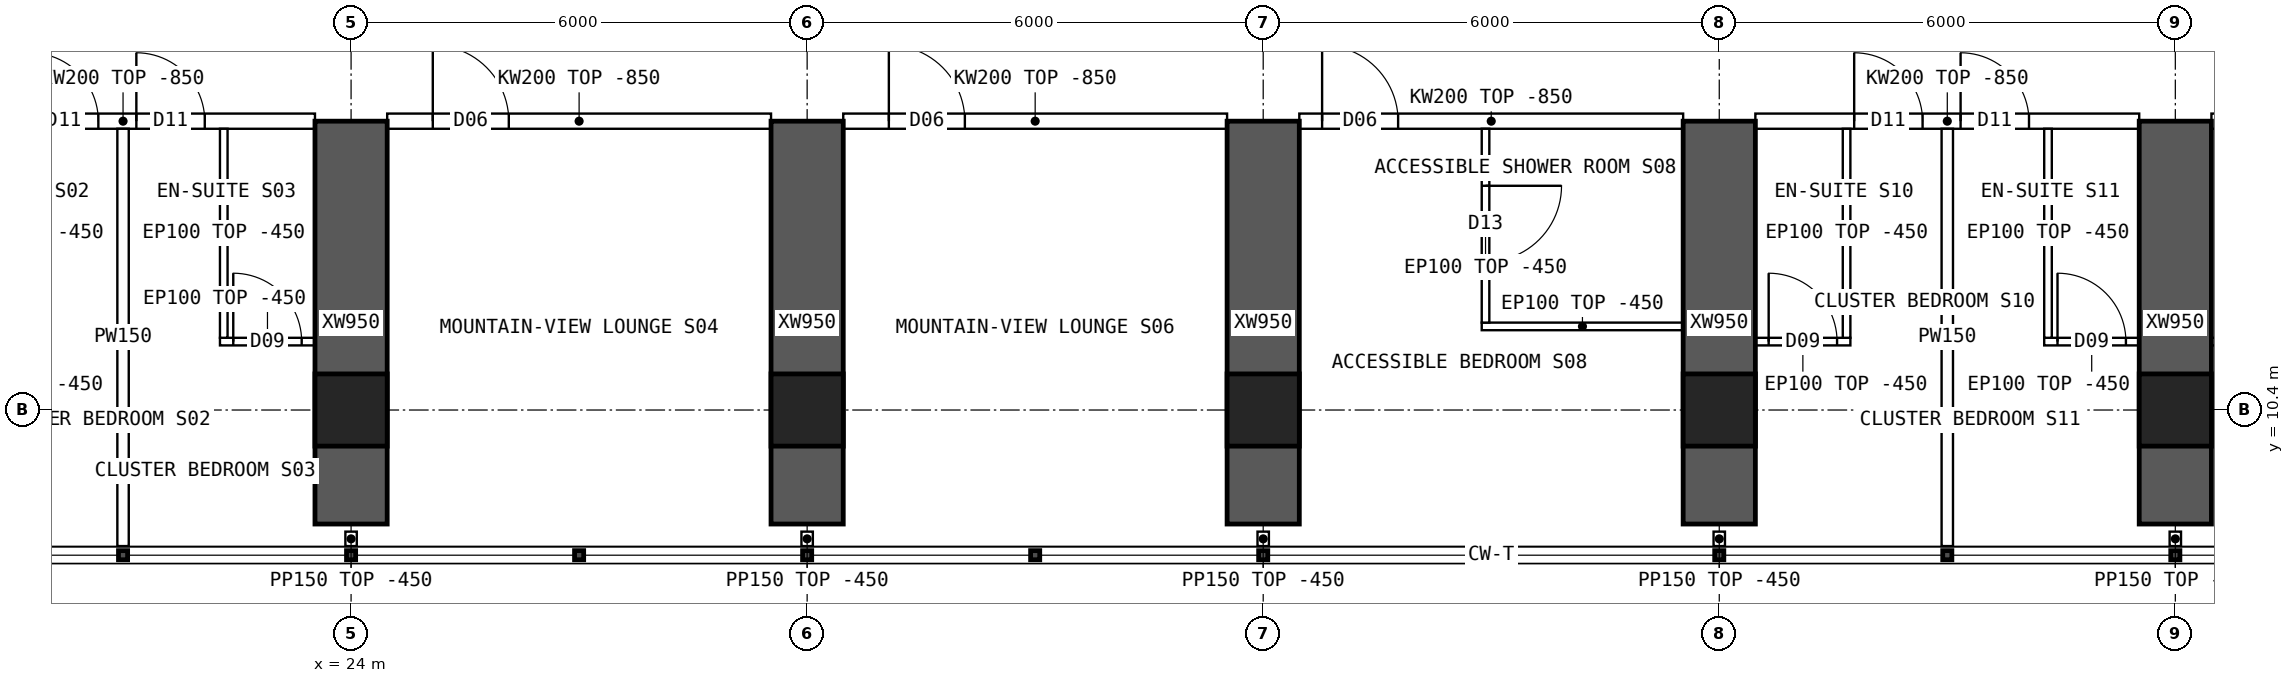
"""IFC4 building model, lengths in metres.
Left out: names, types, materials, properties, quantities, classifications, styles, units other than length and angle.
Written with IfcOpenShell. Run it as: python <this file> out.ifc"""

import sys

from ifc_helpers import new_model, si_unit, direction, frame, frame_2d, origin, origin_2d, place, context, subcontext, project, spatial, polyline, rectangle, hollow_rectangle, outline, extrude, element, fill, save


model = new_model("IFC4")
c1 = context("Model", 3, precision=1e-05, world=origin(), true_north=direction((0.0, 1.0)))
c2 = subcontext(c1, "Body", "Model", "MODEL_VIEW")
j1 = project(units=[si_unit("LENGTHUNIT", "METRE"), si_unit("PLANEANGLEUNIT", "RADIAN")], contexts=[c1])
p1 = place(None, origin())
s1 = spatial("IfcSite", under=j1, at=p1, CompositionType="ELEMENT")
p2 = place(p1, origin())
s2 = spatial("IfcBuilding", under=s1, at=p2, CompositionType="ELEMENT")
p3 = place(p2, frame((0.0, 0.0, 110.65)))
s3 = spatial("IfcBuildingStorey", under=s2, at=p3, CompositionType="ELEMENT", Elevation=110.65)
for number, where, z_axis, x_axis in (
    (1, (24.0, 10.4, 0.0), (0.0, 0.0, 1.0), (1.0, 0.0, 0.0)),
    (2, (30.0, 10.4, 0.0), (0.0, 0.0, 1.0), (1.0, 0.0, 0.0)),
    (3, (36.0, 10.4, 0.0), (0.0, 0.0, 1.0), (1.0, 0.0, 0.0)),
    (4, (42.0, 10.4, 0.0), (0.0, 0.0, 1.0), (1.0, 0.0, 0.0)),
    (5, (48.0, 10.4, 0.0), (0.0, 0.0, 1.0), (1.0, 0.0, 0.0)),
):
    element("IfcColumn", number, at=place(p3, frame(where, z_axis=z_axis, x_axis=x_axis)), inside=s3, PredefinedType="COLUMN", context=c2, shape_type="SweptSolid", body=[
        extrude(hollow_rectangle(XDim=0.95, YDim=0.95, WallThickness=0.095, at=origin_2d()), origin(), (0.0, 0.0, 1.0), 3.75),
    ])
for number, where, z_axis, x_axis in (
    (6, (24.0, 8.9, 0.0), (0.0, 0.0, 1.0), (0.0, 1.0, 0.0)),
    (7, (30.0, 8.9, 0.0), (0.0, 0.0, 1.0), (0.0, 1.0, 0.0)),
    (8, (36.0, 8.9, 0.0), (0.0, 0.0, 1.0), (0.0, 1.0, 0.0)),
    (9, (42.0, 8.9, 0.0), (0.0, 0.0, 1.0), (0.0, 1.0, 0.0)),
    (10, (48.0, 8.9, 0.0), (0.0, 0.0, 1.0), (0.0, 1.0, 0.0)),
):
    element("IfcWall", number, at=place(p3, frame(where, z_axis=z_axis, x_axis=x_axis)), inside=s3, PredefinedType="SHEAR", context=c2, shape_type="SweptSolid", body=[
        extrude(rectangle(XDim=5.3, YDim=0.95, at=frame_2d((2.65, 0.0))), origin(), (0.0, 0.0, 1.0), 3.75),
    ])
p4 = place(p3, frame((18.475, 14.2, 0.0), z_axis=(0.0, 0.0, 1.0), x_axis=(1.0, 0.0, 0.0)))
e11 = element("IfcWall", 11, at=p4, inside=s3, PredefinedType="SOLIDWALL", context=c2, shape_type="SweptSolid", body=[
    extrude(outline(polyline([(0.0, 0.0), (5.05, 0.0), (5.05, 2.9), (0.0, 2.9), (0.0, 0.0)])), frame((0.0, 0.1, 0.0), z_axis=(0.0, -1.0, 0.0), x_axis=(1.0, 0.0, 0.0)), (0.0, 0.0, 1.0), 0.2),
])
p5 = place(p4, frame((1.3, 0.0, 0.0)))
e12 = element("IfcOpeningElement", 12, at=p5, cuts=e11, PredefinedType="OPENING", context=c2, shape_type="SweptSolid", body=[
    extrude(rectangle(XDim=0.9, YDim=2.1, at=frame_2d((0.45, 1.05))), frame((0.0, 0.11, 0.0), z_axis=(0.0, -1.0, 0.0), x_axis=(1.0, 0.0, 0.0)), (0.0, 0.0, 1.0), 0.22),
])
p6 = place(p4, frame((2.7, 0.0, 0.0)))
e13 = element("IfcOpeningElement", 13, at=p6, cuts=e11, PredefinedType="OPENING", context=c2, shape_type="SweptSolid", body=[
    extrude(rectangle(XDim=0.9, YDim=2.1, at=frame_2d((0.45, 1.05))), frame((0.0, 0.11, 0.0), z_axis=(0.0, -1.0, 0.0), x_axis=(1.0, 0.0, 0.0)), (0.0, 0.0, 1.0), 0.22),
])
p7 = place(p3, frame((24.475, 14.2, 0.0), z_axis=(0.0, 0.0, 1.0), x_axis=(1.0, 0.0, 0.0)))
e14 = element("IfcWall", 14, at=p7, inside=s3, PredefinedType="SOLIDWALL", context=c2, shape_type="SweptSolid", body=[
    extrude(outline(polyline([(0.0, 0.0), (5.05, 0.0), (5.05, 2.9), (0.0, 2.9), (0.0, 0.0)])), frame((0.0, 0.1, 0.0), z_axis=(0.0, -1.0, 0.0), x_axis=(1.0, 0.0, 0.0)), (0.0, 0.0, 1.0), 0.2),
])
p8 = place(p7, frame((0.6, 0.0, 0.0)))
e15 = element("IfcOpeningElement", 15, at=p8, cuts=e14, PredefinedType="OPENING", context=c2, shape_type="SweptSolid", body=[
    extrude(rectangle(XDim=1.0, YDim=2.1, at=frame_2d((0.5, 1.05))), frame((0.0, 0.11, 0.0), z_axis=(0.0, -1.0, 0.0), x_axis=(1.0, 0.0, 0.0)), (0.0, 0.0, 1.0), 0.22),
])
p9 = place(p3, frame((30.475, 14.2, 0.0), z_axis=(0.0, 0.0, 1.0), x_axis=(1.0, 0.0, 0.0)))
e16 = element("IfcWall", 16, at=p9, inside=s3, PredefinedType="SOLIDWALL", context=c2, shape_type="SweptSolid", body=[
    extrude(outline(polyline([(0.0, 0.0), (5.05, 0.0), (5.05, 2.9), (0.0, 2.9), (0.0, 0.0)])), frame((0.0, 0.1, 0.0), z_axis=(0.0, -1.0, 0.0), x_axis=(1.0, 0.0, 0.0)), (0.0, 0.0, 1.0), 0.2),
])
p10 = place(p9, frame((0.6, 0.0, 0.0)))
e17 = element("IfcOpeningElement", 17, at=p10, cuts=e16, PredefinedType="OPENING", context=c2, shape_type="SweptSolid", body=[
    extrude(rectangle(XDim=1.0, YDim=2.1, at=frame_2d((0.5, 1.05))), frame((0.0, 0.11, 0.0), z_axis=(0.0, -1.0, 0.0), x_axis=(1.0, 0.0, 0.0)), (0.0, 0.0, 1.0), 0.22),
])
p11 = place(p3, frame((36.475, 14.2, 0.0), z_axis=(0.0, 0.0, 1.0), x_axis=(1.0, 0.0, 0.0)))
e18 = element("IfcWall", 18, at=p11, inside=s3, PredefinedType="SOLIDWALL", context=c2, shape_type="SweptSolid", body=[
    extrude(outline(polyline([(0.0, 0.0), (5.05, 0.0), (5.05, 2.9), (0.0, 2.9), (0.0, 0.0)])), frame((0.0, 0.1, 0.0), z_axis=(0.0, -1.0, 0.0), x_axis=(1.0, 0.0, 0.0)), (0.0, 0.0, 1.0), 0.2),
])
p12 = place(p11, frame((0.3, 0.0, 0.0)))
e19 = element("IfcOpeningElement", 19, at=p12, cuts=e18, PredefinedType="OPENING", context=c2, shape_type="SweptSolid", body=[
    extrude(rectangle(XDim=1.0, YDim=2.1, at=frame_2d((0.5, 1.05))), frame((0.0, 0.11, 0.0), z_axis=(0.0, -1.0, 0.0), x_axis=(1.0, 0.0, 0.0)), (0.0, 0.0, 1.0), 0.22),
])
p13 = place(p3, frame((42.475, 14.2, 0.0), z_axis=(0.0, 0.0, 1.0), x_axis=(1.0, 0.0, 0.0)))
e20 = element("IfcWall", 20, at=p13, inside=s3, PredefinedType="SOLIDWALL", context=c2, shape_type="SweptSolid", body=[
    extrude(outline(polyline([(0.0, 0.0), (5.05, 0.0), (5.05, 2.9), (0.0, 2.9), (0.0, 0.0)])), frame((0.0, 0.1, 0.0), z_axis=(0.0, -1.0, 0.0), x_axis=(1.0, 0.0, 0.0)), (0.0, 0.0, 1.0), 0.2),
])
p14 = place(p13, frame((1.3, 0.0, 0.0)))
e21 = element("IfcOpeningElement", 21, at=p14, cuts=e20, PredefinedType="OPENING", context=c2, shape_type="SweptSolid", body=[
    extrude(rectangle(XDim=0.9, YDim=2.1, at=frame_2d((0.45, 1.05))), frame((0.0, 0.11, 0.0), z_axis=(0.0, -1.0, 0.0), x_axis=(1.0, 0.0, 0.0)), (0.0, 0.0, 1.0), 0.22),
])
p15 = place(p13, frame((2.7, 0.0, 0.0)))
e22 = element("IfcOpeningElement", 22, at=p15, cuts=e20, PredefinedType="OPENING", context=c2, shape_type="SweptSolid", body=[
    extrude(rectangle(XDim=0.9, YDim=2.1, at=frame_2d((0.45, 1.05))), frame((0.0, 0.11, 0.0), z_axis=(0.0, -1.0, 0.0), x_axis=(1.0, 0.0, 0.0)), (0.0, 0.0, 1.0), 0.22),
])
p16 = place(p3, frame((48.475, 14.2, 0.0), z_axis=(0.0, 0.0, 1.0), x_axis=(1.0, 0.0, 0.0)))
e23 = element("IfcWall", 23, at=p16, inside=s3, PredefinedType="SOLIDWALL", context=c2, shape_type="SweptSolid", body=[
    extrude(outline(polyline([(0.0, 0.0), (5.05, 0.0), (5.05, 2.9), (0.0, 2.9), (0.0, 0.0)])), frame((0.0, 0.1, 0.0), z_axis=(0.0, -1.0, 0.0), x_axis=(1.0, 0.0, 0.0)), (0.0, 0.0, 1.0), 0.2),
])
p17 = place(p16, frame((1.3, 0.0, 0.0)))
e24 = element("IfcOpeningElement", 24, at=p17, cuts=e23, PredefinedType="OPENING", context=c2, shape_type="SweptSolid", body=[
    extrude(rectangle(XDim=0.9, YDim=2.1, at=frame_2d((0.45, 1.05))), frame((0.0, 0.11, 0.0), z_axis=(0.0, -1.0, 0.0), x_axis=(1.0, 0.0, 0.0)), (0.0, 0.0, 1.0), 0.22),
])
p18 = place(p16, frame((2.7, 0.0, 0.0)))
e25 = element("IfcOpeningElement", 25, at=p18, cuts=e23, PredefinedType="OPENING", context=c2, shape_type="SweptSolid", body=[
    extrude(rectangle(XDim=0.9, YDim=2.1, at=frame_2d((0.45, 1.05))), frame((0.0, 0.11, 0.0), z_axis=(0.0, -1.0, 0.0), x_axis=(1.0, 0.0, 0.0)), (0.0, 0.0, 1.0), 0.22),
])
p19 = place(p3, frame((21.0, 8.61, 0.0), z_axis=(0.0, 0.0, 1.0), x_axis=(0.0, 1.0, 0.0)))
e26 = element("IfcWall", 26, at=p19, inside=s3, PredefinedType="PARTITIONING", context=c2, shape_type="SweptSolid", body=[
    extrude(outline(polyline([(0.0, 0.0), (5.49, 0.0), (5.49, 2.9), (5.442, 2.9), (5.44, 3.3), (1.992, 3.3), (1.99, 2.9), (1.592, 2.9), (1.59, 3.3), (0.0, 3.3), (0.0, 0.0)])), frame((0.0, 0.075, 0.0), z_axis=(0.0, -1.0, 0.0), x_axis=(1.0, 0.0, 0.0)), (0.0, 0.0, 1.0), 0.15),
])
p20 = place(p3, frame((23.525, 11.3, 0.0), z_axis=(0.0, 0.0, 1.0), x_axis=(-1.0, 0.0, 0.0)))
e27 = element("IfcWall", 27, at=p20, inside=s3, PredefinedType="PARTITIONING", context=c2, shape_type="SweptSolid", body=[
    extrude(rectangle(XDim=1.25, YDim=0.1, at=frame_2d((0.625, 0.0))), origin(), (0.0, 0.0, 1.0), 3.3),
])
p21 = place(p20, frame((0.175, 0.0, 0.0)))
e28 = element("IfcOpeningElement", 28, at=p21, cuts=e27, PredefinedType="OPENING", context=c2, shape_type="SweptSolid", body=[
    extrude(rectangle(XDim=0.9, YDim=2.1, at=frame_2d((0.45, 1.05))), frame((0.0, 0.06, 0.0), z_axis=(0.0, -1.0, 0.0), x_axis=(1.0, 0.0, 0.0)), (0.0, 0.0, 1.0), 0.12),
])
p22 = place(p3, frame((22.325, 11.35, 0.0), z_axis=(0.0, 0.0, 1.0), x_axis=(0.0, 1.0, 0.0)))
e29 = element("IfcWall", 29, at=p22, inside=s3, PredefinedType="PARTITIONING", context=c2, shape_type="SweptSolid", body=[
    extrude(outline(polyline([(0.0, 0.0), (2.75, 0.0), (2.75, 2.9), (2.702, 2.9), (2.7, 3.3), (0.0, 3.3), (0.0, 0.0)])), frame((0.0, 0.05, 0.0), z_axis=(0.0, -1.0, 0.0), x_axis=(1.0, 0.0, 0.0)), (0.0, 0.0, 1.0), 0.1),
])
p23 = place(p3, frame((38.875, 11.5, 0.0), z_axis=(0.0, 0.0, 1.0), x_axis=(1.0, 0.0, 0.0)))
e30 = element("IfcWall", 30, at=p23, inside=s3, PredefinedType="PARTITIONING", context=c2, shape_type="SweptSolid", body=[
    extrude(rectangle(XDim=2.65, YDim=0.1, at=frame_2d((1.325, 0.0))), origin(), (0.0, 0.0, 1.0), 3.3),
])
p24 = place(p3, frame((38.925, 11.55, 0.0), z_axis=(0.0, 0.0, 1.0), x_axis=(0.0, 1.0, 0.0)))
e31 = element("IfcWall", 31, at=p24, inside=s3, PredefinedType="PARTITIONING", context=c2, shape_type="SweptSolid", body=[
    extrude(outline(polyline([(0.0, 0.0), (2.55, 0.0), (2.55, 2.9), (2.502, 2.9), (2.5, 3.3), (0.0, 3.3), (0.0, 0.0)])), frame((0.0, 0.05, 0.0), z_axis=(0.0, -1.0, 0.0), x_axis=(1.0, 0.0, 0.0)), (0.0, 0.0, 1.0), 0.1),
])
p25 = place(p24, frame((0.8, 0.0, 0.0)))
e32 = element("IfcOpeningElement", 32, at=p25, cuts=e31, PredefinedType="OPENING", context=c2, shape_type="SweptSolid", body=[
    extrude(rectangle(XDim=1.0, YDim=2.1, at=frame_2d((0.5, 1.05))), frame((0.0, 0.06, 0.0), z_axis=(0.0, -1.0, 0.0), x_axis=(1.0, 0.0, 0.0)), (0.0, 0.0, 1.0), 0.12),
])
p26 = place(p3, frame((45.0, 8.61, 0.0), z_axis=(0.0, 0.0, 1.0), x_axis=(0.0, 1.0, 0.0)))
e33 = element("IfcWall", 33, at=p26, inside=s3, PredefinedType="PARTITIONING", context=c2, shape_type="SweptSolid", body=[
    extrude(outline(polyline([(0.0, 0.0), (5.49, 0.0), (5.49, 2.9), (5.442, 2.9), (5.44, 3.3), (1.992, 3.3), (1.99, 2.9), (1.592, 2.9), (1.59, 3.3), (0.0, 3.3), (0.0, 0.0)])), frame((0.0, 0.075, 0.0), z_axis=(0.0, -1.0, 0.0), x_axis=(1.0, 0.0, 0.0)), (0.0, 0.0, 1.0), 0.15),
])
p27 = place(p3, frame((43.725, 11.3, 0.0), z_axis=(0.0, 0.0, 1.0), x_axis=(-1.0, 0.0, 0.0)))
e34 = element("IfcWall", 34, at=p27, inside=s3, PredefinedType="PARTITIONING", context=c2, shape_type="SweptSolid", body=[
    extrude(rectangle(XDim=1.25, YDim=0.1, at=frame_2d((0.625, 0.0))), origin(), (0.0, 0.0, 1.0), 3.3),
])
p28 = place(p27, frame((0.175, 0.0, 0.0)))
e35 = element("IfcOpeningElement", 35, at=p28, cuts=e34, PredefinedType="OPENING", context=c2, shape_type="SweptSolid", body=[
    extrude(rectangle(XDim=0.9, YDim=2.1, at=frame_2d((0.45, 1.05))), frame((0.0, 0.06, 0.0), z_axis=(0.0, -1.0, 0.0), x_axis=(1.0, 0.0, 0.0)), (0.0, 0.0, 1.0), 0.12),
])
p29 = place(p3, frame((43.675, 11.35, 0.0), z_axis=(0.0, 0.0, 1.0), x_axis=(0.0, 1.0, 0.0)))
e36 = element("IfcWall", 36, at=p29, inside=s3, PredefinedType="PARTITIONING", context=c2, shape_type="SweptSolid", body=[
    extrude(outline(polyline([(0.0, 0.0), (2.75, 0.0), (2.75, 2.9), (2.702, 2.9), (2.7, 3.3), (0.0, 3.3), (0.0, 0.0)])), frame((0.0, 0.05, 0.0), z_axis=(0.0, -1.0, 0.0), x_axis=(1.0, 0.0, 0.0)), (0.0, 0.0, 1.0), 0.1),
])
p30 = place(p3, frame((47.525, 11.3, 0.0), z_axis=(0.0, 0.0, 1.0), x_axis=(-1.0, 0.0, 0.0)))
e37 = element("IfcWall", 37, at=p30, inside=s3, PredefinedType="PARTITIONING", context=c2, shape_type="SweptSolid", body=[
    extrude(rectangle(XDim=1.25, YDim=0.1, at=frame_2d((0.625, 0.0))), origin(), (0.0, 0.0, 1.0), 3.3),
])
p31 = place(p30, frame((0.175, 0.0, 0.0)))
e38 = element("IfcOpeningElement", 38, at=p31, cuts=e37, PredefinedType="OPENING", context=c2, shape_type="SweptSolid", body=[
    extrude(rectangle(XDim=0.9, YDim=2.1, at=frame_2d((0.45, 1.05))), frame((0.0, 0.06, 0.0), z_axis=(0.0, -1.0, 0.0), x_axis=(1.0, 0.0, 0.0)), (0.0, 0.0, 1.0), 0.12),
])
p32 = place(p3, frame((46.325, 11.35, 0.0), z_axis=(0.0, 0.0, 1.0), x_axis=(0.0, 1.0, 0.0)))
e39 = element("IfcWall", 39, at=p32, inside=s3, PredefinedType="PARTITIONING", context=c2, shape_type="SweptSolid", body=[
    extrude(outline(polyline([(0.0, 0.0), (2.75, 0.0), (2.75, 2.9), (2.702, 2.9), (2.7, 3.3), (0.0, 3.3), (0.0, 0.0)])), frame((0.0, 0.05, 0.0), z_axis=(0.0, -1.0, 0.0), x_axis=(1.0, 0.0, 0.0)), (0.0, 0.0, 1.0), 0.1),
])
p33 = place(p3, frame((49.725, 11.3, 0.0), z_axis=(0.0, 0.0, 1.0), x_axis=(-1.0, 0.0, 0.0)))
e40 = element("IfcWall", 40, at=p33, inside=s3, PredefinedType="PARTITIONING", context=c2, shape_type="SweptSolid", body=[
    extrude(rectangle(XDim=1.25, YDim=0.1, at=frame_2d((0.625, 0.0))), origin(), (0.0, 0.0, 1.0), 3.3),
])
p34 = place(p33, frame((0.175, 0.0, 0.0)))
e41 = element("IfcOpeningElement", 41, at=p34, cuts=e40, PredefinedType="OPENING", context=c2, shape_type="SweptSolid", body=[
    extrude(rectangle(XDim=0.9, YDim=2.1, at=frame_2d((0.45, 1.05))), frame((0.0, 0.06, 0.0), z_axis=(0.0, -1.0, 0.0), x_axis=(1.0, 0.0, 0.0)), (0.0, 0.0, 1.0), 0.12),
])
for number, where, z_axis, x_axis in (
    (42, (24.0, 8.8, 0.0), (0.0, 0.0, 1.0), (0.0, -1.0, 0.0)),
    (43, (30.0, 8.8, 0.0), (0.0, 0.0, 1.0), (0.0, -1.0, 0.0)),
    (44, (36.0, 8.8, 0.0), (0.0, 0.0, 1.0), (0.0, -1.0, 0.0)),
    (45, (42.0, 8.8, 0.0), (0.0, 0.0, 1.0), (0.0, -1.0, 0.0)),
    (46, (48.0, 8.8, 0.0), (0.0, 0.0, 1.0), (0.0, -1.0, 0.0)),
):
    element("IfcWall", number, at=place(p3, frame(where, z_axis=z_axis, x_axis=x_axis)), inside=s3, PredefinedType="PARTITIONING", context=c2, shape_type="SweptSolid", body=[
        extrude(rectangle(XDim=0.19, YDim=0.15, at=frame_2d((0.095, 0.0))), origin(), (0.0, 0.0, 1.0), 3.3),
    ])
p35 = place(p5, origin())
e47 = element("IfcDoor", 47, at=p35, inside=s3, OperationType="SINGLE_SWING_LEFT", PredefinedType="DOOR", context=c2, shape_type="SweptSolid", body=[
    extrude(rectangle(XDim=0.9, YDim=2.1, at=frame_2d((0.45, 1.05))), frame((0.0, 0.025, 0.0), z_axis=(0.0, -1.0, 0.0), x_axis=(1.0, 0.0, 0.0)), (0.0, 0.0, 1.0), 0.05),
])
fill(e12, e47)
p36 = place(p21, origin())
e48 = element("IfcDoor", 48, at=p36, inside=s3, OperationType="SINGLE_SWING_RIGHT", PredefinedType="DOOR", context=c2, shape_type="SweptSolid", body=[
    extrude(rectangle(XDim=0.9, YDim=2.1, at=frame_2d((0.45, 1.05))), frame((0.0, 0.025, 0.0), z_axis=(0.0, -1.0, 0.0), x_axis=(1.0, 0.0, 0.0)), (0.0, 0.0, 1.0), 0.05),
])
fill(e28, e48)
p37 = place(p6, origin())
e49 = element("IfcDoor", 49, at=p37, inside=s3, OperationType="SINGLE_SWING_LEFT", PredefinedType="DOOR", context=c2, shape_type="SweptSolid", body=[
    extrude(rectangle(XDim=0.9, YDim=2.1, at=frame_2d((0.45, 1.05))), frame((0.0, 0.025, 0.0), z_axis=(0.0, -1.0, 0.0), x_axis=(1.0, 0.0, 0.0)), (0.0, 0.0, 1.0), 0.05),
])
fill(e13, e49)
p38 = place(p8, origin())
e50 = element("IfcDoor", 50, at=p38, inside=s3, OperationType="SINGLE_SWING_LEFT", PredefinedType="DOOR", context=c2, shape_type="SweptSolid", body=[
    extrude(rectangle(XDim=1.0, YDim=2.1, at=frame_2d((0.5, 1.05))), frame((0.0, 0.025, 0.0), z_axis=(0.0, -1.0, 0.0), x_axis=(1.0, 0.0, 0.0)), (0.0, 0.0, 1.0), 0.05),
])
fill(e15, e50)
p39 = place(p10, origin())
e51 = element("IfcDoor", 51, at=p39, inside=s3, OperationType="SINGLE_SWING_LEFT", PredefinedType="DOOR", context=c2, shape_type="SweptSolid", body=[
    extrude(rectangle(XDim=1.0, YDim=2.1, at=frame_2d((0.5, 1.05))), frame((0.0, 0.025, 0.0), z_axis=(0.0, -1.0, 0.0), x_axis=(1.0, 0.0, 0.0)), (0.0, 0.0, 1.0), 0.05),
])
fill(e17, e51)
p40 = place(p25, origin())
e52 = element("IfcDoor", 52, at=p40, inside=s3, OperationType="SINGLE_SWING_RIGHT", PredefinedType="DOOR", context=c2, shape_type="SweptSolid", body=[
    extrude(rectangle(XDim=1.0, YDim=2.1, at=frame_2d((0.5, 1.05))), frame((0.0, 0.025, 0.0), z_axis=(0.0, -1.0, 0.0), x_axis=(1.0, 0.0, 0.0)), (0.0, 0.0, 1.0), 0.05),
])
fill(e32, e52)
p41 = place(p12, origin())
e53 = element("IfcDoor", 53, at=p41, inside=s3, OperationType="SINGLE_SWING_LEFT", PredefinedType="DOOR", context=c2, shape_type="SweptSolid", body=[
    extrude(rectangle(XDim=1.0, YDim=2.1, at=frame_2d((0.5, 1.05))), frame((0.0, 0.025, 0.0), z_axis=(0.0, -1.0, 0.0), x_axis=(1.0, 0.0, 0.0)), (0.0, 0.0, 1.0), 0.05),
])
fill(e19, e53)
p42 = place(p28, origin())
e54 = element("IfcDoor", 54, at=p42, inside=s3, OperationType="SINGLE_SWING_RIGHT", PredefinedType="DOOR", context=c2, shape_type="SweptSolid", body=[
    extrude(rectangle(XDim=0.9, YDim=2.1, at=frame_2d((0.45, 1.05))), frame((0.0, 0.025, 0.0), z_axis=(0.0, -1.0, 0.0), x_axis=(1.0, 0.0, 0.0)), (0.0, 0.0, 1.0), 0.05),
])
fill(e35, e54)
p43 = place(p14, origin())
e55 = element("IfcDoor", 55, at=p43, inside=s3, OperationType="SINGLE_SWING_LEFT", PredefinedType="DOOR", context=c2, shape_type="SweptSolid", body=[
    extrude(rectangle(XDim=0.9, YDim=2.1, at=frame_2d((0.45, 1.05))), frame((0.0, 0.025, 0.0), z_axis=(0.0, -1.0, 0.0), x_axis=(1.0, 0.0, 0.0)), (0.0, 0.0, 1.0), 0.05),
])
fill(e21, e55)
p44 = place(p31, origin())
e56 = element("IfcDoor", 56, at=p44, inside=s3, OperationType="SINGLE_SWING_RIGHT", PredefinedType="DOOR", context=c2, shape_type="SweptSolid", body=[
    extrude(rectangle(XDim=0.9, YDim=2.1, at=frame_2d((0.45, 1.05))), frame((0.0, 0.025, 0.0), z_axis=(0.0, -1.0, 0.0), x_axis=(1.0, 0.0, 0.0)), (0.0, 0.0, 1.0), 0.05),
])
fill(e38, e56)
p45 = place(p15, origin())
e57 = element("IfcDoor", 57, at=p45, inside=s3, OperationType="SINGLE_SWING_LEFT", PredefinedType="DOOR", context=c2, shape_type="SweptSolid", body=[
    extrude(rectangle(XDim=0.9, YDim=2.1, at=frame_2d((0.45, 1.05))), frame((0.0, 0.025, 0.0), z_axis=(0.0, -1.0, 0.0), x_axis=(1.0, 0.0, 0.0)), (0.0, 0.0, 1.0), 0.05),
])
fill(e22, e57)
save(model, sys.argv[1])
